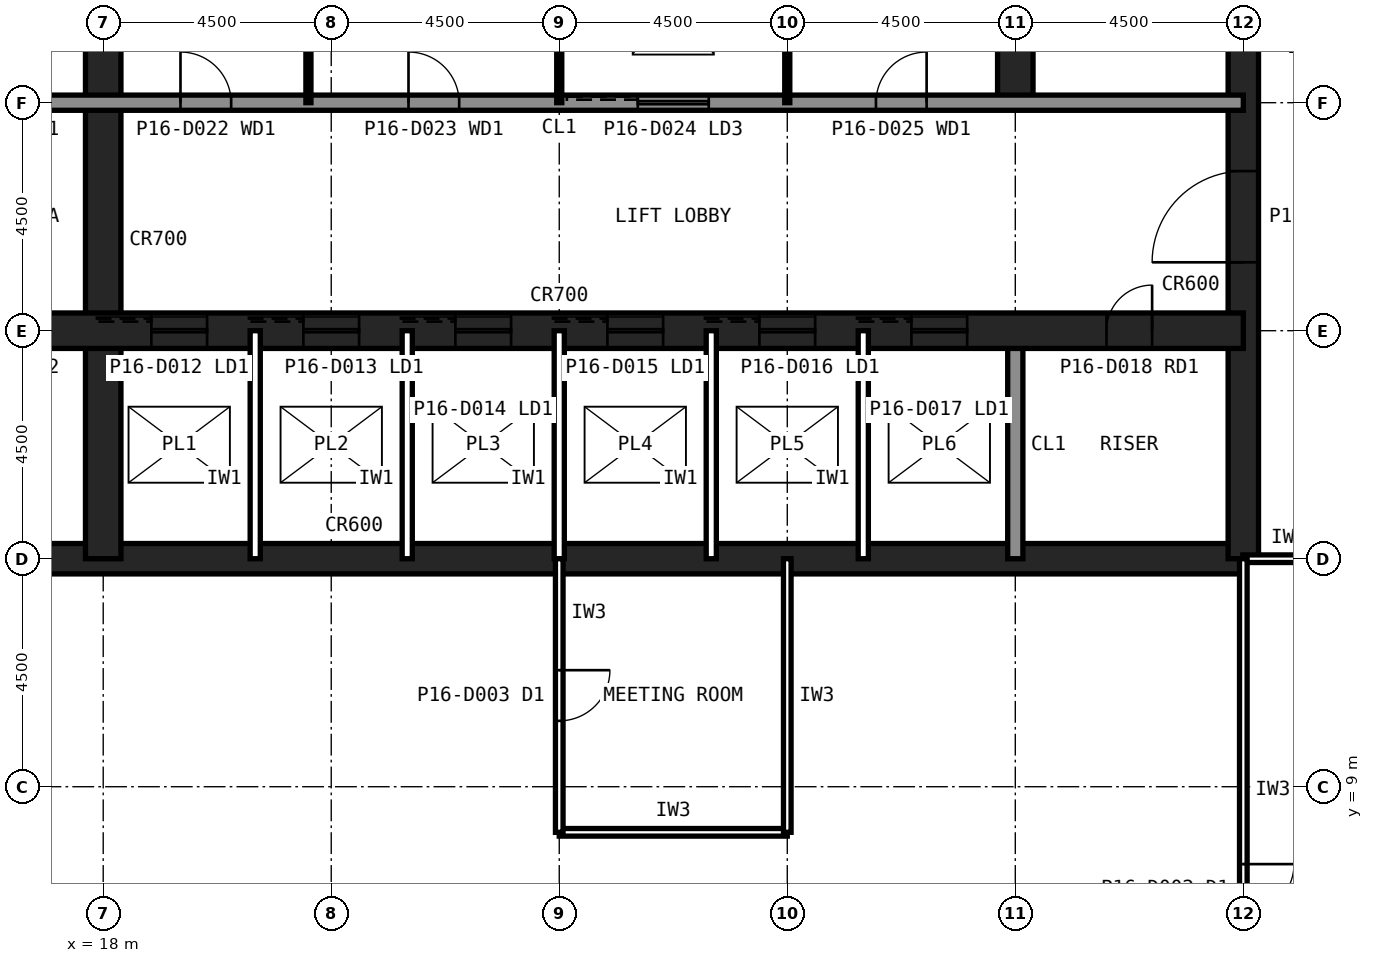
"""IFC4 building model, lengths in metres.
Left out: names, types, materials, properties, quantities, classifications, styles, units other than length and angle.
Written with IfcOpenShell. Run it as: python <this file> out.ifc"""

import sys

from ifc_helpers import new_model, si_unit, direction, frame, frame_2d, origin, place, context, subcontext, project, spatial, rectangle, extrude, element, fill, save


model = new_model("IFC4")
c1 = context("Model", 3, precision=1e-05, world=origin(), true_north=direction((0.0, 1.0)))
c2 = subcontext(c1, "Body", "Model", "MODEL_VIEW")
j1 = project(units=[si_unit("LENGTHUNIT", "METRE"), si_unit("PLANEANGLEUNIT", "RADIAN")], contexts=[c1])
p1 = place(None, origin())
s1 = spatial("IfcSite", under=j1, at=p1, CompositionType="ELEMENT")
p2 = place(p1, origin())
s2 = spatial("IfcBuilding", under=s1, at=p2, CompositionType="ELEMENT")
p3 = place(p2, frame((0.0, 0.0, 71.0)))
s3 = spatial("IfcBuildingStorey", under=s2, at=p3, CompositionType="ELEMENT", Elevation=71.0)
p4 = place(p3, frame((13.5, 13.5, 0.0), z_axis=(0.0, 0.0, 1.0), x_axis=(1.0, 0.0, 0.0)))
e1 = element("IfcWall", 1, at=p4, inside=s3, PredefinedType="SHEAR", context=c2, shape_type="SweptSolid", body=[
    extrude(rectangle(XDim=27.0, YDim=0.6, at=frame_2d((13.5, 0.0))), origin(), (0.0, 0.0, 1.0), 4.2),
])
p5 = place(p3, frame((40.5, 13.5, 0.0), z_axis=(0.0, 0.0, 1.0), x_axis=(0.0, 1.0, 0.0)))
e2 = element("IfcWall", 2, at=p5, inside=s3, PredefinedType="SHEAR", context=c2, shape_type="SweptSolid", body=[
    extrude(rectangle(XDim=27.0, YDim=0.6, at=frame_2d((13.5, 0.0))), origin(), (0.0, 0.0, 1.0), 4.2),
])
p6 = place(p5, frame((5.85, 0.0, 0.0)))
e3 = element("IfcOpeningElement", 3, at=p6, cuts=e2, PredefinedType="OPENING", context=c2, shape_type="SweptSolid", body=[
    extrude(rectangle(XDim=1.8, YDim=2.1, at=frame_2d((0.9, 1.05))), frame((0.0, 0.31, 0.0), z_axis=(0.0, -1.0, 0.0), x_axis=(1.0, 0.0, 0.0)), (0.0, 0.0, 1.0), 0.62),
])
p7 = place(p5, frame((19.65, 0.0, 0.0)))
e4 = element("IfcOpeningElement", 4, at=p7, cuts=e2, PredefinedType="OPENING", context=c2, shape_type="SweptSolid", body=[
    extrude(rectangle(XDim=1.2, YDim=2.1, at=frame_2d((0.6, 1.05))), frame((0.0, 0.31, 0.0), z_axis=(0.0, -1.0, 0.0), x_axis=(1.0, 0.0, 0.0)), (0.0, 0.0, 1.0), 0.62),
])
p8 = place(p3, frame((18.0, 13.5, 0.0), z_axis=(0.0, 0.0, 1.0), x_axis=(0.0, 1.0, 0.0)))
e5 = element("IfcWall", 5, at=p8, inside=s3, PredefinedType="SHEAR", context=c2, shape_type="SweptSolid", body=[
    extrude(rectangle(XDim=18.0, YDim=0.7, at=frame_2d((9.0, 0.0))), origin(), (0.0, 0.0, 1.0), 4.2),
])
p9 = place(p3, frame((36.0, 13.5, 0.0), z_axis=(0.0, 0.0, 1.0), x_axis=(0.0, 1.0, 0.0)))
e6 = element("IfcWall", 6, at=p9, inside=s3, PredefinedType="SOLIDWALL", context=c2, shape_type="SweptSolid", body=[
    extrude(rectangle(XDim=4.5, YDim=0.3, at=frame_2d((2.25, 0.0))), origin(), (0.0, 0.0, 1.0), 4.04),
])
p10 = place(p3, frame((36.0, 22.5, 0.0), z_axis=(0.0, 0.0, 1.0), x_axis=(0.0, 1.0, 0.0)))
e7 = element("IfcWall", 7, at=p10, inside=s3, PredefinedType="SHEAR", context=c2, shape_type="SweptSolid", body=[
    extrude(rectangle(XDim=18.0, YDim=0.7, at=frame_2d((9.0, 0.0))), origin(), (0.0, 0.0, 1.0), 4.2),
])
p11 = place(p3, frame((13.5, 18.0, 0.0), z_axis=(0.0, 0.0, 1.0), x_axis=(1.0, 0.0, 0.0)))
e8 = element("IfcWall", 8, at=p11, inside=s3, PredefinedType="SHEAR", context=c2, shape_type="SweptSolid", body=[
    extrude(rectangle(XDim=27.0, YDim=0.7, at=frame_2d((13.5, 0.0))), origin(), (0.0, 0.0, 1.0), 4.2),
])
p12 = place(p11, frame((24.3, 0.0, 0.0)))
e9 = element("IfcOpeningElement", 9, at=p12, cuts=e8, PredefinedType="OPENING", context=c2, shape_type="SweptSolid", body=[
    extrude(rectangle(XDim=0.9, YDim=2.1, at=frame_2d((0.45, 1.05))), frame((0.0, 0.36, 0.0), z_axis=(0.0, -1.0, 0.0), x_axis=(1.0, 0.0, 0.0)), (0.0, 0.0, 1.0), 0.72),
])
p13 = place(p11, frame((5.45, 0.0, 0.0)))
e10 = element("IfcOpeningElement", 10, at=p13, cuts=e8, PredefinedType="OPENING", context=c2, shape_type="SweptSolid", body=[
    extrude(rectangle(XDim=1.1, YDim=2.1, at=frame_2d((0.55, 1.05))), frame((0.0, 0.36, 0.0), z_axis=(0.0, -1.0, 0.0), x_axis=(1.0, 0.0, 0.0)), (0.0, 0.0, 1.0), 0.72),
])
p14 = place(p11, frame((8.45, 0.0, 0.0)))
e11 = element("IfcOpeningElement", 11, at=p14, cuts=e8, PredefinedType="OPENING", context=c2, shape_type="SweptSolid", body=[
    extrude(rectangle(XDim=1.1, YDim=2.1, at=frame_2d((0.55, 1.05))), frame((0.0, 0.36, 0.0), z_axis=(0.0, -1.0, 0.0), x_axis=(1.0, 0.0, 0.0)), (0.0, 0.0, 1.0), 0.72),
])
p15 = place(p11, frame((11.45, 0.0, 0.0)))
e12 = element("IfcOpeningElement", 12, at=p15, cuts=e8, PredefinedType="OPENING", context=c2, shape_type="SweptSolid", body=[
    extrude(rectangle(XDim=1.1, YDim=2.1, at=frame_2d((0.55, 1.05))), frame((0.0, 0.36, 0.0), z_axis=(0.0, -1.0, 0.0), x_axis=(1.0, 0.0, 0.0)), (0.0, 0.0, 1.0), 0.72),
])
p16 = place(p11, frame((14.45, 0.0, 0.0)))
e13 = element("IfcOpeningElement", 13, at=p16, cuts=e8, PredefinedType="OPENING", context=c2, shape_type="SweptSolid", body=[
    extrude(rectangle(XDim=1.1, YDim=2.1, at=frame_2d((0.55, 1.05))), frame((0.0, 0.36, 0.0), z_axis=(0.0, -1.0, 0.0), x_axis=(1.0, 0.0, 0.0)), (0.0, 0.0, 1.0), 0.72),
])
p17 = place(p11, frame((17.45, 0.0, 0.0)))
e14 = element("IfcOpeningElement", 14, at=p17, cuts=e8, PredefinedType="OPENING", context=c2, shape_type="SweptSolid", body=[
    extrude(rectangle(XDim=1.1, YDim=2.1, at=frame_2d((0.55, 1.05))), frame((0.0, 0.36, 0.0), z_axis=(0.0, -1.0, 0.0), x_axis=(1.0, 0.0, 0.0)), (0.0, 0.0, 1.0), 0.72),
])
p18 = place(p11, frame((20.45, 0.0, 0.0)))
e15 = element("IfcOpeningElement", 15, at=p18, cuts=e8, PredefinedType="OPENING", context=c2, shape_type="SweptSolid", body=[
    extrude(rectangle(XDim=1.1, YDim=2.1, at=frame_2d((0.55, 1.05))), frame((0.0, 0.36, 0.0), z_axis=(0.0, -1.0, 0.0), x_axis=(1.0, 0.0, 0.0)), (0.0, 0.0, 1.0), 0.72),
])
p19 = place(p11, frame((1.6, 0.0, 0.0)))
e16 = element("IfcOpeningElement", 16, at=p19, cuts=e8, PredefinedType="OPENING", context=c2, shape_type="SweptSolid", body=[
    extrude(rectangle(XDim=1.3, YDim=2.2, at=frame_2d((0.65, 1.1))), frame((0.0, 0.36, 0.0), z_axis=(0.0, -1.0, 0.0), x_axis=(1.0, 0.0, 0.0)), (0.0, 0.0, 1.0), 0.72),
])
p20 = place(p3, frame((13.5, 22.5, 0.0), z_axis=(0.0, 0.0, 1.0), x_axis=(1.0, 0.0, 0.0)))
e17 = element("IfcWall", 17, at=p20, inside=s3, PredefinedType="SOLIDWALL", context=c2, shape_type="SweptSolid", body=[
    extrude(rectangle(XDim=27.0, YDim=0.3, at=frame_2d((13.5, 0.0))), origin(), (0.0, 0.0, 1.0), 4.04),
])
p21 = place(p20, frame((1.65, 0.0, 0.0)))
e18 = element("IfcOpeningElement", 18, at=p21, cuts=e17, PredefinedType="OPENING", context=c2, shape_type="SweptSolid", body=[
    extrude(rectangle(XDim=1.2, YDim=2.1, at=frame_2d((0.6, 1.05))), frame((0.0, 0.16, 0.0), z_axis=(0.0, -1.0, 0.0), x_axis=(1.0, 0.0, 0.0)), (0.0, 0.0, 1.0), 0.32),
])
p22 = place(p20, frame((6.025, 0.0, 0.0)))
e19 = element("IfcOpeningElement", 19, at=p22, cuts=e17, PredefinedType="OPENING", context=c2, shape_type="SweptSolid", body=[
    extrude(rectangle(XDim=1.0, YDim=2.1, at=frame_2d((0.5, 1.05))), frame((0.0, 0.16, 0.0), z_axis=(0.0, -1.0, 0.0), x_axis=(1.0, 0.0, 0.0)), (0.0, 0.0, 1.0), 0.32),
])
p23 = place(p20, frame((10.525, 0.0, 0.0)))
e20 = element("IfcOpeningElement", 20, at=p23, cuts=e17, PredefinedType="OPENING", context=c2, shape_type="SweptSolid", body=[
    extrude(rectangle(XDim=1.0, YDim=2.1, at=frame_2d((0.5, 1.05))), frame((0.0, 0.16, 0.0), z_axis=(0.0, -1.0, 0.0), x_axis=(1.0, 0.0, 0.0)), (0.0, 0.0, 1.0), 0.32),
])
p24 = place(p20, frame((19.75, 0.0, 0.0)))
e21 = element("IfcOpeningElement", 21, at=p24, cuts=e17, PredefinedType="OPENING", context=c2, shape_type="SweptSolid", body=[
    extrude(rectangle(XDim=1.0, YDim=2.1, at=frame_2d((0.5, 1.05))), frame((0.0, 0.16, 0.0), z_axis=(0.0, -1.0, 0.0), x_axis=(1.0, 0.0, 0.0)), (0.0, 0.0, 1.0), 0.32),
])
p25 = place(p20, frame((15.05, 0.0, 0.0)))
e22 = element("IfcOpeningElement", 22, at=p25, cuts=e17, PredefinedType="OPENING", context=c2, shape_type="SweptSolid", body=[
    extrude(rectangle(XDim=1.4, YDim=2.4, at=frame_2d((0.7, 1.2))), frame((0.0, 0.16, 0.0), z_axis=(0.0, -1.0, 0.0), x_axis=(1.0, 0.0, 0.0)), (0.0, 0.0, 1.0), 0.32),
])
for number, where, z_axis, x_axis in (
    (23, (21.0, 13.5, 0.0), (0.0, 0.0, 1.0), (0.0, 1.0, 0.0)),
    (24, (24.0, 13.5, 0.0), (0.0, 0.0, 1.0), (0.0, 1.0, 0.0)),
    (25, (27.0, 13.5, 0.0), (0.0, 0.0, 1.0), (0.0, 1.0, 0.0)),
    (26, (30.0, 13.5, 0.0), (0.0, 0.0, 1.0), (0.0, 1.0, 0.0)),
    (27, (33.0, 13.5, 0.0), (0.0, 0.0, 1.0), (0.0, 1.0, 0.0)),
):
    element("IfcWall", number, at=place(p3, frame(where, z_axis=z_axis, x_axis=x_axis)), inside=s3, PredefinedType="PARTITIONING", context=c2, shape_type="SweptSolid", body=[
        extrude(rectangle(XDim=4.5, YDim=0.2, at=frame_2d((2.25, 0.0))), origin(), (0.0, 0.0, 1.0), 4.04),
    ])
for number, where, z_axis, x_axis in (
    (28, (22.05, 22.5, 0.0), (0.0, 0.0, 1.0), (0.0, 1.0, 0.0)),
    (29, (27.0, 22.5, 0.0), (0.0, 0.0, 1.0), (0.0, 1.0, 0.0)),
    (30, (31.5, 22.5, 0.0), (0.0, 0.0, 1.0), (0.0, 1.0, 0.0)),
):
    element("IfcWall", number, at=place(p3, frame(where, z_axis=z_axis, x_axis=x_axis)), inside=s3, PredefinedType="PLUMBINGWALL", context=c2, shape_type="SweptSolid", body=[
        extrude(rectangle(XDim=9.0, YDim=0.1, at=frame_2d((4.5, 0.0))), origin(), (0.0, 0.0, 1.0), 4.04),
    ])
p26 = place(p3, frame((40.49, 13.5, 0.0), z_axis=(0.0, 0.0, 1.0), x_axis=(1.0, 0.0, 0.0)))
e31 = element("IfcWall", 31, at=p26, inside=s3, PredefinedType="PARTITIONING", context=c2, shape_type="SweptSolid", body=[
    extrude(rectangle(XDim=1.81, YDim=0.15, at=frame_2d((0.905, 0.0))), origin(), (0.0, 0.0, 1.0), 3.189),
])
p27 = place(p3, frame((27.0, 8.1, 0.0), z_axis=(0.0, 0.0, 1.0), x_axis=(1.0, 0.0, 0.0)))
e32 = element("IfcWall", 32, at=p27, inside=s3, PredefinedType="PARTITIONING", context=c2, shape_type="SweptSolid", body=[
    extrude(rectangle(XDim=4.5, YDim=0.15, at=frame_2d((2.25, 0.0))), origin(), (0.0, 0.0, 1.0), 4.04),
])
p28 = place(p3, frame((31.5, 8.1, 0.0), z_axis=(0.0, 0.0, 1.0), x_axis=(0.0, 1.0, 0.0)))
e33 = element("IfcWall", 33, at=p28, inside=s3, PredefinedType="PARTITIONING", context=c2, shape_type="SweptSolid", body=[
    extrude(rectangle(XDim=5.4, YDim=0.15, at=frame_2d((2.7, 0.0))), origin(), (0.0, 0.0, 1.0), 3.189),
])
p29 = place(p3, frame((27.0, 13.5, 0.0), z_axis=(0.0, 0.0, 1.0), x_axis=(0.0, -1.0, 0.0)))
e34 = element("IfcWall", 34, at=p29, inside=s3, PredefinedType="PARTITIONING", context=c2, shape_type="SweptSolid", body=[
    extrude(rectangle(XDim=5.4, YDim=0.15, at=frame_2d((2.7, 0.0))), origin(), (0.0, 0.0, 1.0), 3.189),
])
p30 = place(p29, frame((2.2, 0.0, 0.0)))
e35 = element("IfcOpeningElement", 35, at=p30, cuts=e34, PredefinedType="OPENING", context=c2, shape_type="SweptSolid", body=[
    extrude(rectangle(XDim=1.0, YDim=2.1, at=frame_2d((0.5, 1.05))), frame((0.0, 0.085, 0.0), z_axis=(0.0, -1.0, 0.0), x_axis=(1.0, 0.0, 0.0)), (0.0, 0.0, 1.0), 0.17),
])
p31 = place(p3, frame((40.5, 13.5, 0.0), z_axis=(0.0, 0.0, 1.0), x_axis=(0.0, -1.0, 0.0)))
e36 = element("IfcWall", 36, at=p31, inside=s3, PredefinedType="PARTITIONING", context=c2, shape_type="SweptSolid", body=[
    extrude(rectangle(XDim=13.055, YDim=0.15, at=frame_2d((6.527, 0.0))), origin(), (0.0, 0.0, 1.0), 3.189),
])
p32 = place(p31, frame((6.028, 0.0, 0.0)))
e37 = element("IfcOpeningElement", 37, at=p32, cuts=e36, PredefinedType="OPENING", context=c2, shape_type="SweptSolid", body=[
    extrude(rectangle(XDim=1.0, YDim=2.1, at=frame_2d((0.5, 1.05))), frame((0.0, 0.085, 0.0), z_axis=(0.0, -1.0, 0.0), x_axis=(1.0, 0.0, 0.0)), (0.0, 0.0, 1.0), 0.17),
])
p33 = place(p6, origin())
e38 = element("IfcDoor", 38, at=p33, inside=s3, OperationType="SINGLE_SWING_LEFT", PredefinedType="DOOR", context=c2, shape_type="SweptSolid", body=[
    extrude(rectangle(XDim=1.8, YDim=2.1, at=frame_2d((0.9, 1.05))), frame((0.0, 0.025, 0.0), z_axis=(0.0, -1.0, 0.0), x_axis=(1.0, 0.0, 0.0)), (0.0, 0.0, 1.0), 0.05),
])
fill(e3, e38)
p34 = place(p22, origin())
e39 = element("IfcDoor", 39, at=p34, inside=s3, OperationType="SINGLE_SWING_LEFT", PredefinedType="DOOR", context=c2, shape_type="SweptSolid", body=[
    extrude(rectangle(XDim=1.0, YDim=2.1, at=frame_2d((0.5, 1.05))), frame((0.0, 0.025, 0.0), z_axis=(0.0, -1.0, 0.0), x_axis=(1.0, 0.0, 0.0)), (0.0, 0.0, 1.0), 0.05),
])
fill(e19, e39)
p35 = place(p23, origin())
e40 = element("IfcDoor", 40, at=p35, inside=s3, OperationType="SINGLE_SWING_LEFT", PredefinedType="DOOR", context=c2, shape_type="SweptSolid", body=[
    extrude(rectangle(XDim=1.0, YDim=2.1, at=frame_2d((0.5, 1.05))), frame((0.0, 0.025, 0.0), z_axis=(0.0, -1.0, 0.0), x_axis=(1.0, 0.0, 0.0)), (0.0, 0.0, 1.0), 0.05),
])
fill(e20, e40)
p36 = place(p24, origin())
e41 = element("IfcDoor", 41, at=p36, inside=s3, OperationType="SINGLE_SWING_RIGHT", PredefinedType="DOOR", context=c2, shape_type="SweptSolid", body=[
    extrude(rectangle(XDim=1.0, YDim=2.1, at=frame_2d((0.5, 1.05))), frame((0.0, 0.025, 0.0), z_axis=(0.0, -1.0, 0.0), x_axis=(1.0, 0.0, 0.0)), (0.0, 0.0, 1.0), 0.05),
])
fill(e21, e41)
p37 = place(p12, origin())
e42 = element("IfcDoor", 42, at=p37, inside=s3, OperationType="SINGLE_SWING_RIGHT", PredefinedType="DOOR", context=c2, shape_type="SweptSolid", body=[
    extrude(rectangle(XDim=0.9, YDim=2.1, at=frame_2d((0.45, 1.05))), frame((0.0, 0.025, 0.0), z_axis=(0.0, -1.0, 0.0), x_axis=(1.0, 0.0, 0.0)), (0.0, 0.0, 1.0), 0.05),
])
fill(e9, e42)
p38 = place(p13, origin())
e43 = element("IfcDoor", 43, at=p38, inside=s3, OperationType="SLIDING_TO_LEFT", PredefinedType="DOOR", context=c2, shape_type="SweptSolid", body=[
    extrude(rectangle(XDim=1.1, YDim=2.1, at=frame_2d((0.55, 1.05))), frame((0.0, 0.025, 0.0), z_axis=(0.0, -1.0, 0.0), x_axis=(1.0, 0.0, 0.0)), (0.0, 0.0, 1.0), 0.05),
])
fill(e10, e43)
p39 = place(p14, origin())
e44 = element("IfcDoor", 44, at=p39, inside=s3, OperationType="SLIDING_TO_LEFT", PredefinedType="DOOR", context=c2, shape_type="SweptSolid", body=[
    extrude(rectangle(XDim=1.1, YDim=2.1, at=frame_2d((0.55, 1.05))), frame((0.0, 0.025, 0.0), z_axis=(0.0, -1.0, 0.0), x_axis=(1.0, 0.0, 0.0)), (0.0, 0.0, 1.0), 0.05),
])
fill(e11, e44)
p40 = place(p15, origin())
e45 = element("IfcDoor", 45, at=p40, inside=s3, OperationType="SLIDING_TO_LEFT", PredefinedType="DOOR", context=c2, shape_type="SweptSolid", body=[
    extrude(rectangle(XDim=1.1, YDim=2.1, at=frame_2d((0.55, 1.05))), frame((0.0, 0.025, 0.0), z_axis=(0.0, -1.0, 0.0), x_axis=(1.0, 0.0, 0.0)), (0.0, 0.0, 1.0), 0.05),
])
fill(e12, e45)
p41 = place(p16, origin())
e46 = element("IfcDoor", 46, at=p41, inside=s3, OperationType="SLIDING_TO_LEFT", PredefinedType="DOOR", context=c2, shape_type="SweptSolid", body=[
    extrude(rectangle(XDim=1.1, YDim=2.1, at=frame_2d((0.55, 1.05))), frame((0.0, 0.025, 0.0), z_axis=(0.0, -1.0, 0.0), x_axis=(1.0, 0.0, 0.0)), (0.0, 0.0, 1.0), 0.05),
])
fill(e13, e46)
p42 = place(p17, origin())
e47 = element("IfcDoor", 47, at=p42, inside=s3, OperationType="SLIDING_TO_LEFT", PredefinedType="DOOR", context=c2, shape_type="SweptSolid", body=[
    extrude(rectangle(XDim=1.1, YDim=2.1, at=frame_2d((0.55, 1.05))), frame((0.0, 0.025, 0.0), z_axis=(0.0, -1.0, 0.0), x_axis=(1.0, 0.0, 0.0)), (0.0, 0.0, 1.0), 0.05),
])
fill(e14, e47)
p43 = place(p18, origin())
e48 = element("IfcDoor", 48, at=p43, inside=s3, OperationType="SLIDING_TO_LEFT", PredefinedType="DOOR", context=c2, shape_type="SweptSolid", body=[
    extrude(rectangle(XDim=1.1, YDim=2.1, at=frame_2d((0.55, 1.05))), frame((0.0, 0.025, 0.0), z_axis=(0.0, -1.0, 0.0), x_axis=(1.0, 0.0, 0.0)), (0.0, 0.0, 1.0), 0.05),
])
fill(e15, e48)
p44 = place(p25, origin())
e49 = element("IfcDoor", 49, at=p44, inside=s3, OperationType="SLIDING_TO_LEFT", PredefinedType="DOOR", context=c2, shape_type="SweptSolid", body=[
    extrude(rectangle(XDim=1.4, YDim=2.4, at=frame_2d((0.7, 1.2))), frame((0.0, 0.025, 0.0), z_axis=(0.0, -1.0, 0.0), x_axis=(1.0, 0.0, 0.0)), (0.0, 0.0, 1.0), 0.05),
])
fill(e22, e49)
p45 = place(p30, origin())
e50 = element("IfcDoor", 50, at=p45, inside=s3, OperationType="SINGLE_SWING_LEFT", PredefinedType="DOOR", context=c2, shape_type="SweptSolid", body=[
    extrude(rectangle(XDim=1.0, YDim=2.1, at=frame_2d((0.5, 1.05))), frame((0.0, 0.025, 0.0), z_axis=(0.0, -1.0, 0.0), x_axis=(1.0, 0.0, 0.0)), (0.0, 0.0, 1.0), 0.05),
])
fill(e35, e50)
p46 = place(p32, origin())
e51 = element("IfcDoor", 51, at=p46, inside=s3, OperationType="SINGLE_SWING_LEFT", PredefinedType="DOOR", context=c2, shape_type="SweptSolid", body=[
    extrude(rectangle(XDim=1.0, YDim=2.1, at=frame_2d((0.5, 1.05))), frame((0.0, 0.025, 0.0), z_axis=(0.0, -1.0, 0.0), x_axis=(1.0, 0.0, 0.0)), (0.0, 0.0, 1.0), 0.05),
])
fill(e37, e51)
save(model, sys.argv[1])
